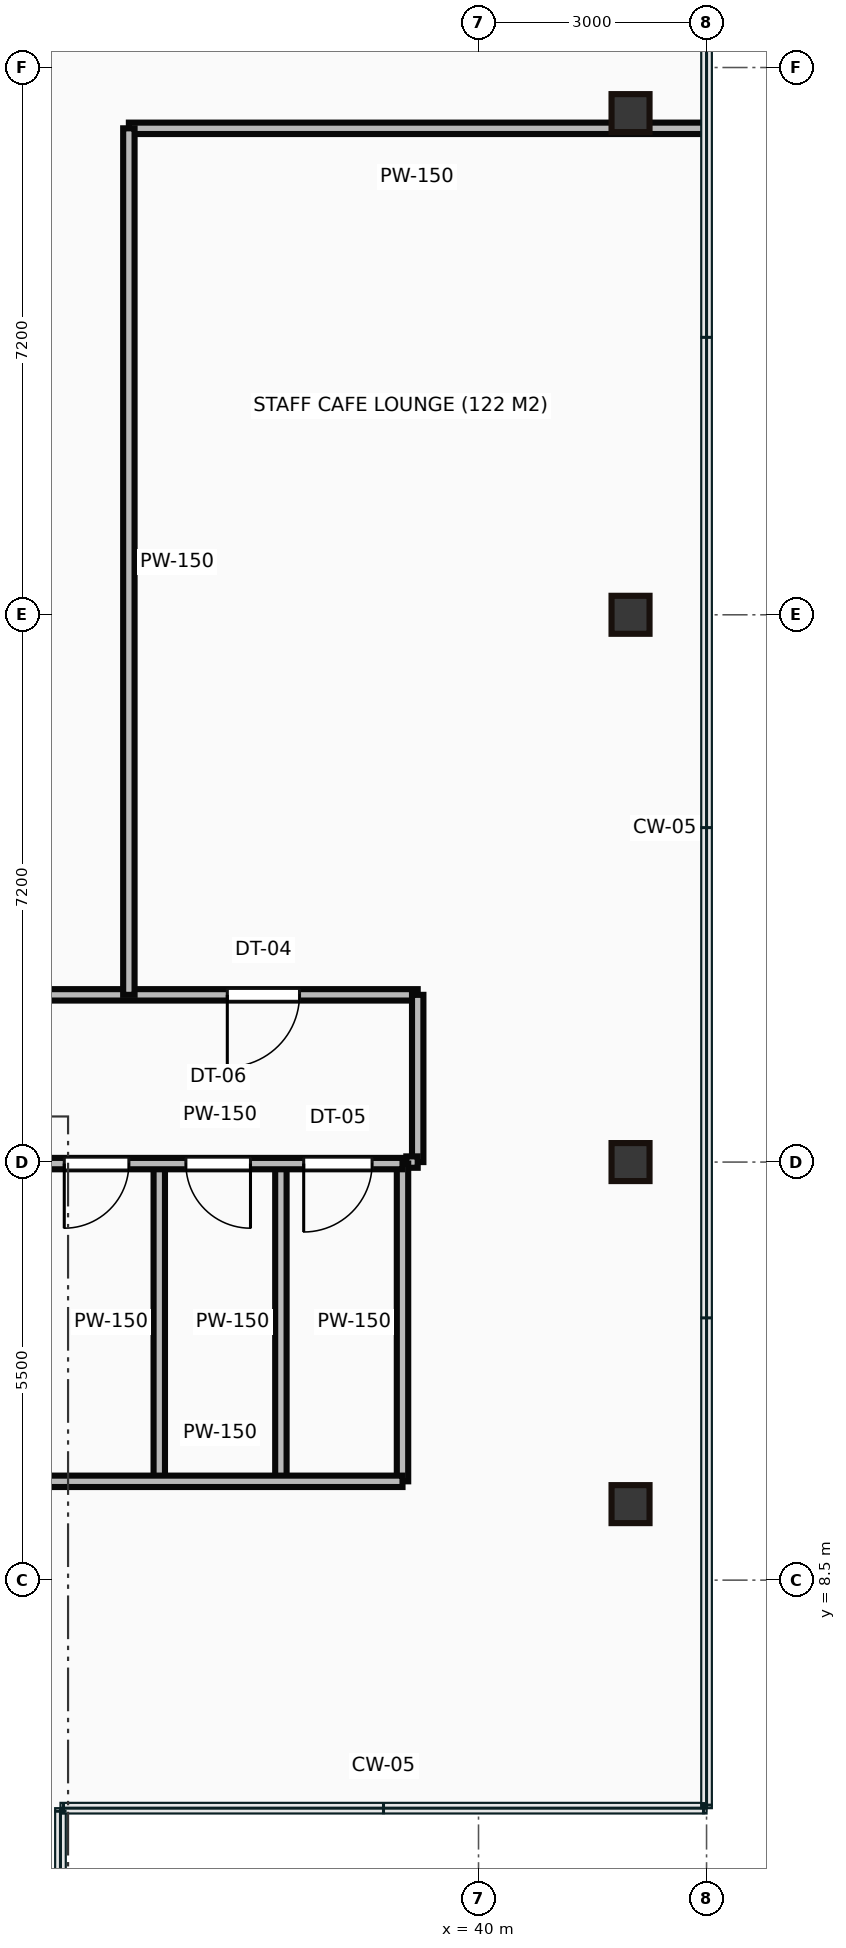
"""IFC4 building model, lengths in metres.
Left out: names, types, materials, properties, quantities, classifications, styles, units other than length and angle.
Written with IfcOpenShell. Run it as: python <this file> out.ifc"""

import sys

from ifc_helpers import new_model, si_unit, direction, frame, frame_2d, origin, origin_2d, place, context, subcontext, project, spatial, rectangle, hollow_rectangle, extrude, source, transform, mapped, element, fill, save


model = new_model("IFC4")
c1 = context("Model", 3, precision=1e-05, world=origin(), true_north=direction((0.0, 1.0)))
c2 = subcontext(c1, "Body", "Model", "MODEL_VIEW")
j1 = project(units=[si_unit("LENGTHUNIT", "METRE"), si_unit("PLANEANGLEUNIT", "RADIAN")], contexts=[c1])
p1 = place(None, origin())
s1 = spatial("IfcSite", under=j1, at=p1, CompositionType="ELEMENT")
p2 = place(p1, origin())
s2 = spatial("IfcBuilding", under=s1, at=p2, CompositionType="ELEMENT")
p3 = place(p2, frame((0.0, 0.0, 214.15)))
s3 = spatial("IfcBuildingStorey", under=s2, at=p3, CompositionType="ELEMENT", Elevation=214.15)
m1 = source(origin(), c2, "Body", "SweptSolid", [
    extrude(hollow_rectangle(XDim=0.5, YDim=0.5, WallThickness=0.022, at=origin_2d()), origin(), (0.0, 0.0, 1.0), 3.65),
])
for number, where, z_axis, x_axis in (
    (1, (42.0, 9.5, 0.0), (0.0, 0.0, 1.0), (1.0, 0.0, 0.0)),
    (2, (42.0, 14.0, 0.0), (0.0, 0.0, 1.0), (1.0, 0.0, 0.0)),
    (3, (42.0, 21.2, 0.0), (0.0, 0.0, 1.0), (1.0, 0.0, 0.0)),
    (4, (42.0, 27.8, 0.0), (0.0, 0.0, 1.0), (1.0, 0.0, 0.0)),
):
    element("IfcColumn", number, at=place(p3, frame(where, z_axis=z_axis, x_axis=x_axis)), inside=s3, PredefinedType="COLUMN", context=c2, shape_type="MappedRepresentation", body=[
        mapped(m1, transform((0.0, 0.0, 0.0))),
    ])
m2 = source(origin(), c2, "Body", "SweptSolid", [
    extrude(rectangle(XDim=4.8, YDim=0.15, at=frame_2d((2.4, 0.0))), origin(), (0.0, 0.0, 1.0), 2.787),
])
p4 = place(p3, frame((34.2, 13.98, 0.0), z_axis=(0.0, 0.0, 1.0), x_axis=(1.0, 0.0, 0.0)))
e5 = element("IfcWall", 5, at=p4, inside=s3, PredefinedType="PARTITIONING", context=c2, shape_type="MappedRepresentation", body=[
    mapped(m2, transform((0.0, 0.0, 0.0))),
])
p5 = place(p4, frame((0.35, 0.0, 0.0)))
e6 = element("IfcOpeningElement", 6, at=p5, cuts=e5, PredefinedType="OPENING", context=c2, shape_type="SweptSolid", body=[
    extrude(rectangle(XDim=0.85, YDim=2.1, at=frame_2d((0.425, 1.05))), frame((0.0, 0.085, 0.0), z_axis=(0.0, -1.0, 0.0), x_axis=(1.0, 0.0, 0.0)), (0.0, 0.0, 1.0), 0.17),
])
p6 = place(p4, frame((1.95, 0.0, 0.0)))
e7 = element("IfcOpeningElement", 7, at=p6, cuts=e5, PredefinedType="OPENING", context=c2, shape_type="SweptSolid", body=[
    extrude(rectangle(XDim=0.85, YDim=2.1, at=frame_2d((0.425, 1.05))), frame((0.0, 0.085, 0.0), z_axis=(0.0, -1.0, 0.0), x_axis=(1.0, 0.0, 0.0)), (0.0, 0.0, 1.0), 0.17),
])
p7 = place(p4, frame((3.5, 0.0, 0.0)))
e8 = element("IfcOpeningElement", 8, at=p7, cuts=e5, PredefinedType="OPENING", context=c2, shape_type="SweptSolid", body=[
    extrude(rectangle(XDim=0.9, YDim=2.1, at=frame_2d((0.45, 1.05))), frame((0.0, 0.085, 0.0), z_axis=(0.0, -1.0, 0.0), x_axis=(1.0, 0.0, 0.0)), (0.0, 0.0, 1.0), 0.17),
])
m3 = source(origin(), c2, "Body", "SweptSolid", [
    extrude(rectangle(XDim=4.8, YDim=0.15, at=frame_2d((2.4, 0.0))), origin(), (0.0, 0.0, 1.0), 3.4),
])
p8 = place(p3, frame((34.2, 9.8, 0.0), z_axis=(0.0, 0.0, 1.0), x_axis=(1.0, 0.0, 0.0)))
e9 = element("IfcWall", 9, at=p8, inside=s3, PredefinedType="PARTITIONING", context=c2, shape_type="MappedRepresentation", body=[
    mapped(m3, transform((0.0, 0.0, 0.0))),
])
m4 = source(origin(), c2, "Body", "SweptSolid", [
    extrude(rectangle(XDim=4.18, YDim=0.15, at=frame_2d((2.09, 0.0))), origin(), (0.0, 0.0, 1.0), 3.4),
])
for number, where, z_axis, x_axis in (
    (10, (39.0, 9.8, 0.0), (0.0, 0.0, 1.0), (0.0, 1.0, 0.0)),
    (11, (35.8, 9.8, 0.0), (0.0, 0.0, 1.0), (0.0, 1.0, 0.0)),
    (12, (37.4, 9.8, 0.0), (0.0, 0.0, 1.0), (0.0, 1.0, 0.0)),
):
    element("IfcWall", number, at=place(p3, frame(where, z_axis=z_axis, x_axis=x_axis)), inside=s3, PredefinedType="PARTITIONING", context=c2, shape_type="MappedRepresentation", body=[
        mapped(m4, transform((0.0, 0.0, 0.0))),
    ])
m5 = source(origin(), c2, "Body", "SweptSolid", [
    extrude(rectangle(XDim=20.2, YDim=0.15, at=frame_2d((10.1, 0.0))), origin(), (0.0, 0.0, 1.0), 3.4),
])
p9 = place(p3, frame((19.0, 16.2, 0.0), z_axis=(0.0, 0.0, 1.0), x_axis=(1.0, 0.0, 0.0)))
e13 = element("IfcWall", 13, at=p9, inside=s3, PredefinedType="PARTITIONING", context=c2, shape_type="MappedRepresentation", body=[
    mapped(m5, transform((0.0, 0.0, 0.0))),
])
p10 = place(p9, frame((9.625, 0.0, 0.0)))
e14 = element("IfcOpeningElement", 14, at=p10, cuts=e13, PredefinedType="OPENING", context=c2, shape_type="SweptSolid", body=[
    extrude(rectangle(XDim=0.95, YDim=2.15, at=frame_2d((0.475, 1.075))), frame((0.0, 0.085, 0.0), z_axis=(0.0, -1.0, 0.0), x_axis=(1.0, 0.0, 0.0)), (0.0, 0.0, 1.0), 0.17),
])
p11 = place(p9, frame((17.695, 0.0, 0.0)))
e15 = element("IfcOpeningElement", 15, at=p11, cuts=e13, PredefinedType="OPENING", context=c2, shape_type="SweptSolid", body=[
    extrude(rectangle(XDim=0.95, YDim=2.15, at=frame_2d((0.475, 1.075))), frame((0.0, 0.085, 0.0), z_axis=(0.0, -1.0, 0.0), x_axis=(1.0, 0.0, 0.0)), (0.0, 0.0, 1.0), 0.17),
])
m6 = source(origin(), c2, "Body", "SweptSolid", [
    extrude(rectangle(XDim=2.2, YDim=0.15, at=frame_2d((1.1, 0.0))), origin(), (0.0, 0.0, 1.0), 3.4),
])
p12 = place(p3, frame((39.2, 16.2, 0.0), z_axis=(0.0, 0.0, 1.0), x_axis=(0.0, -1.0, 0.0)))
e16 = element("IfcWall", 16, at=p12, inside=s3, PredefinedType="PARTITIONING", context=c2, shape_type="MappedRepresentation", body=[
    mapped(m6, transform((0.0, 0.0, 0.0))),
])
m7 = source(origin(), c2, "Body", "SweptSolid", [
    extrude(rectangle(XDim=0.15, YDim=0.15, at=frame_2d((0.075, 0.0))), origin(), (0.0, 0.0, 1.0), 3.4),
])
p13 = place(p3, frame((39.2, 14.0, 0.0), z_axis=(0.0, 0.0, 1.0), x_axis=(-1.0, 0.0, 0.0)))
e17 = element("IfcWall", 17, at=p13, inside=s3, PredefinedType="PARTITIONING", context=c2, shape_type="MappedRepresentation", body=[
    mapped(m7, transform((0.0, 0.0, 0.0))),
])
m8 = source(origin(), c2, "Body", "SweptSolid", [
    extrude(rectangle(XDim=7.58, YDim=0.15, at=frame_2d((3.79, 0.0))), origin(), (0.0, 0.0, 1.0), 3.4),
])
p14 = place(p3, frame((42.98, 27.6, 0.0), z_axis=(0.0, 0.0, 1.0), x_axis=(-1.0, 0.0, 0.0)))
e18 = element("IfcWall", 18, at=p14, inside=s3, PredefinedType="PARTITIONING", context=c2, shape_type="MappedRepresentation", body=[
    mapped(m8, transform((0.0, 0.0, 0.0))),
])
m9 = source(origin(), c2, "Body", "SweptSolid", [
    extrude(rectangle(XDim=11.4, YDim=0.15, at=frame_2d((5.7, 0.0))), origin(), (0.0, 0.0, 1.0), 3.4),
])
p15 = place(p3, frame((35.4, 27.6, 0.0), z_axis=(0.0, 0.0, 1.0), x_axis=(0.0, -1.0, 0.0)))
e19 = element("IfcWall", 19, at=p15, inside=s3, PredefinedType="PARTITIONING", context=c2, shape_type="MappedRepresentation", body=[
    mapped(m9, transform((0.0, 0.0, 0.0))),
])
m10 = source(origin(), c2, "Body", "SweptSolid", [
    extrude(rectangle(XDim=0.85, YDim=2.1, at=frame_2d((0.425, 1.05))), frame((0.0, 0.025, 0.0), z_axis=(0.0, -1.0, 0.0), x_axis=(1.0, 0.0, 0.0)), (0.0, 0.0, 1.0), 0.05),
])
p16 = place(p5, frame((0.85, 0.0, 0.0), z_axis=(0.0, 0.0, 1.0), x_axis=(-1.0, 0.0, 0.0)))
e20 = element("IfcDoor", 20, at=p16, inside=s3, OperationType="SINGLE_SWING_LEFT", PredefinedType="DOOR", context=c2, shape_type="MappedRepresentation", body=[
    mapped(m10, transform((0.0, 0.0, 0.0))),
])
fill(e6, e20)
p17 = place(p6, frame((0.85, 0.0, 0.0), z_axis=(0.0, 0.0, 1.0), x_axis=(-1.0, 0.0, 0.0)))
e21 = element("IfcDoor", 21, at=p17, inside=s3, OperationType="SINGLE_SWING_RIGHT", PredefinedType="DOOR", context=c2, shape_type="MappedRepresentation", body=[
    mapped(m10, transform((0.0, 0.0, 0.0))),
])
fill(e7, e21)
m11 = source(origin(), c2, "Body", "SweptSolid", [
    extrude(rectangle(XDim=0.9, YDim=2.1, at=frame_2d((0.45, 1.05))), frame((0.0, 0.025, 0.0), z_axis=(0.0, -1.0, 0.0), x_axis=(1.0, 0.0, 0.0)), (0.0, 0.0, 1.0), 0.05),
])
p18 = place(p7, frame((0.9, 0.0, 0.0), z_axis=(0.0, 0.0, 1.0), x_axis=(-1.0, 0.0, 0.0)))
e22 = element("IfcDoor", 22, at=p18, inside=s3, OperationType="SINGLE_SWING_LEFT", PredefinedType="DOOR", context=c2, shape_type="MappedRepresentation", body=[
    mapped(m11, transform((0.0, 0.0, 0.0))),
])
fill(e8, e22)
m12 = source(origin(), c2, "Body", "SweptSolid", [
    extrude(rectangle(XDim=0.95, YDim=2.15, at=frame_2d((0.475, 1.075))), frame((0.0, 0.025, 0.0), z_axis=(0.0, -1.0, 0.0), x_axis=(1.0, 0.0, 0.0)), (0.0, 0.0, 1.0), 0.05),
])
p19 = place(p11, origin())
e23 = element("IfcDoor", 23, at=p19, inside=s3, OperationType="SINGLE_SWING_LEFT", PredefinedType="DOOR", context=c2, shape_type="MappedRepresentation", body=[
    mapped(m12, transform((0.0, 0.0, 0.0))),
])
fill(e15, e23)
save(model, sys.argv[1])
